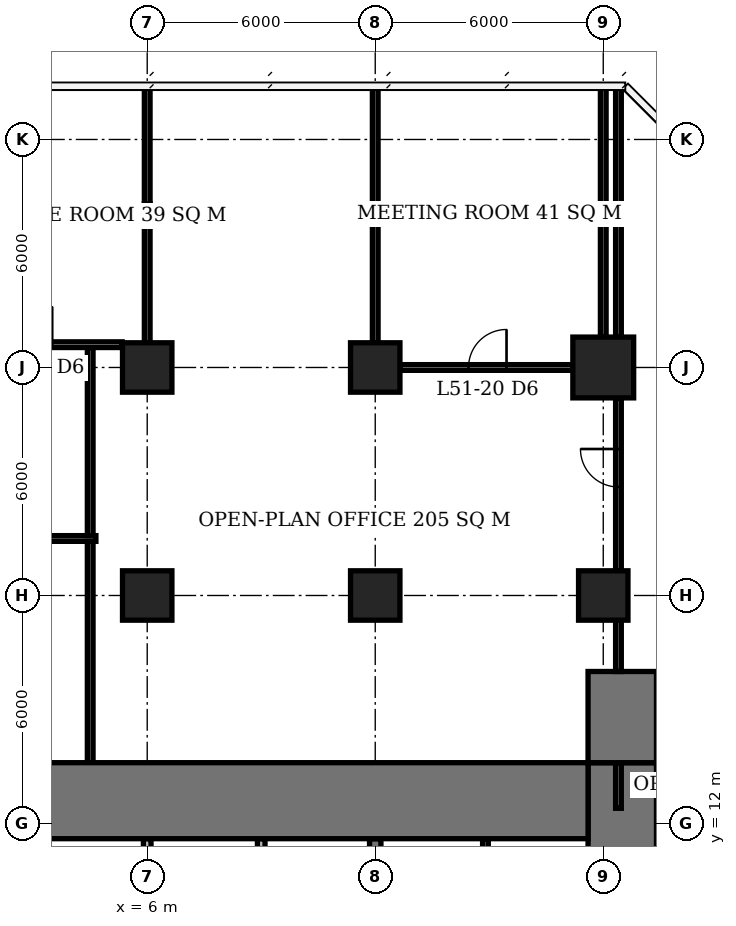
"""IFC4 building model, lengths in metres.
Left out: names, types, materials, properties, quantities, classifications, styles, units other than length and angle.
Written with IfcOpenShell. Run it as: python <this file> out.ifc"""

import sys

from ifc_helpers import new_model, si_unit, direction, frame, frame_2d, origin, origin_2d, place, context, subcontext, project, spatial, rectangle, extrude, element, fill, save


model = new_model("IFC4")
c1 = context("Model", 3, precision=1e-05, world=origin(), true_north=direction((0.0, 1.0)))
c2 = subcontext(c1, "Body", "Model", "MODEL_VIEW")
j1 = project(units=[si_unit("LENGTHUNIT", "METRE"), si_unit("PLANEANGLEUNIT", "RADIAN")], contexts=[c1])
p1 = place(None, origin())
s1 = spatial("IfcSite", under=j1, at=p1, CompositionType="ELEMENT")
p2 = place(p1, origin())
s2 = spatial("IfcBuilding", under=s1, at=p2, CompositionType="ELEMENT")
p3 = place(p2, frame((0.0, 0.0, 208.4)))
s3 = spatial("IfcBuildingStorey", under=s2, at=p3, CompositionType="ELEMENT", Elevation=208.4)
for number, where, z_axis, x_axis in (
    (1, (6.0, 18.0, 0.0), (0.0, 0.0, 1.0), (1.0, 0.0, 0.0)),
    (2, (6.0, 24.0, 0.0), (0.0, 0.0, 1.0), (1.0, 0.0, 0.0)),
    (3, (12.0, 18.0, 0.0), (0.0, 0.0, 1.0), (1.0, 0.0, 0.0)),
    (4, (12.0, 24.0, 0.0), (0.0, 0.0, 1.0), (1.0, 0.0, 0.0)),
    (5, (18.0, 18.0, 0.0), (0.0, 0.0, 1.0), (1.0, 0.0, 0.0)),
):
    element("IfcColumn", number, at=place(p3, frame(where, z_axis=z_axis, x_axis=x_axis)), inside=s3, PredefinedType="COLUMN", context=c2, shape_type="SweptSolid", body=[
        extrude(rectangle(XDim=1.3, YDim=1.3, at=origin_2d()), origin(), (0.0, 0.0, 1.0), 3.9),
    ])
p4 = place(p3, frame((18.0, 24.0, 0.0), z_axis=(0.0, 0.0, 1.0), x_axis=(1.0, 0.0, 0.0)))
e6 = element("IfcColumn", 6, at=p4, inside=s3, PredefinedType="COLUMN", context=c2, shape_type="SweptSolid", body=[
    extrude(rectangle(XDim=1.6, YDim=1.6, at=origin_2d()), origin(), (0.0, 0.0, 1.0), 3.9),
])
p5 = place(p3, frame((-5.6, 12.6, 0.0), z_axis=(0.0, 0.0, 1.0), x_axis=(1.0, 0.0, 0.0)))
e7 = element("IfcWall", 7, at=p5, inside=s3, PredefinedType="SHEAR", context=c2, shape_type="SweptSolid", body=[
    extrude(rectangle(XDim=23.2, YDim=2.0, at=frame_2d((11.6, 0.0))), origin(), (0.0, 0.0, 1.0), 3.9),
])
p6 = place(p3, frame((18.5, -7.6, 0.0), z_axis=(0.0, 0.0, 1.0), x_axis=(0.0, 1.0, 0.0)))
e8 = element("IfcWall", 8, at=p6, inside=s3, PredefinedType="SHEAR", context=c2, shape_type="SweptSolid", body=[
    extrude(rectangle(XDim=21.2, YDim=1.8, at=frame_2d((10.6, 0.0))), origin(), (0.0, 0.0, 1.0), 3.9),
])
p7 = place(p6, frame((9.2, 0.0, 0.0)))
e9 = element("IfcOpeningElement", 9, at=p7, cuts=e8, PredefinedType="OPENING", context=c2, shape_type="SweptSolid", body=[
    extrude(rectangle(XDim=1.8, YDim=2.4, at=frame_2d((0.9, 1.2))), frame((0.0, 0.91, 0.0), z_axis=(0.0, -1.0, 0.0), x_axis=(1.0, 0.0, 0.0)), (0.0, 0.0, 1.0), 1.82),
])
p8 = place(p3, frame((18.5, 13.6, 0.0), z_axis=(0.0, 0.0, 1.0), x_axis=(0.0, 1.0, 0.0)))
e10 = element("IfcWall", 10, at=p8, inside=s3, PredefinedType="SHEAR", context=c2, shape_type="SweptSolid", body=[
    extrude(rectangle(XDim=2.4, YDim=1.8, at=frame_2d((1.2, 0.0))), origin(), (0.0, 0.0, 1.0), 3.9),
])
p9 = place(p3, frame((12.0, 6.15, 0.0), z_axis=(0.0, 0.0, 1.0), x_axis=(0.0, 1.0, 0.0)))
e11 = element("IfcWall", 11, at=p9, inside=s3, PredefinedType="SHEAR", context=c2, shape_type="SweptSolid", body=[
    extrude(rectangle(XDim=5.45, YDim=0.3, at=frame_2d((2.725, 0.0))), origin(), (0.0, 0.0, 1.0), 3.9),
])
for number, where, z_axis, x_axis in (
    (12, (6.0, 6.15, 0.0), (0.0, 0.0, 1.0), (0.0, 1.0, 0.0)),
    (13, (9.0, 6.15, 0.0), (0.0, 0.0, 1.0), (0.0, 1.0, 0.0)),
):
    element("IfcWall", number, at=place(p3, frame(where, z_axis=z_axis, x_axis=x_axis)), inside=s3, PredefinedType="SOLIDWALL", context=c2, shape_type="SweptSolid", body=[
        extrude(rectangle(XDim=5.45, YDim=0.2, at=frame_2d((2.725, 0.0))), origin(), (0.0, 0.0, 1.0), 3.9),
    ])
p10 = place(p3, frame((14.9, 6.15, 0.0), z_axis=(0.0, 0.0, 1.0), x_axis=(0.0, 1.0, 0.0)))
e14 = element("IfcWall", 14, at=p10, inside=s3, PredefinedType="PLUMBINGWALL", context=c2, shape_type="SweptSolid", body=[
    extrude(rectangle(XDim=5.45, YDim=0.15, at=frame_2d((2.725, 0.0))), origin(), (0.0, 0.0, 1.0), 3.65),
])
p11 = place(p3, frame((12.66, 24.0, 0.0), z_axis=(0.0, 0.0, 1.0), x_axis=(1.0, 0.0, 0.0)))
e15 = element("IfcWall", 15, at=p11, inside=s3, PredefinedType="PARTITIONING", context=c2, shape_type="SweptSolid", body=[
    extrude(rectangle(XDim=4.54, YDim=0.15, at=frame_2d((2.27, 0.0))), origin(), (0.0, 0.0, 1.0), 3.65),
])
p12 = place(p11, frame((1.795, 0.0, 0.0)))
e16 = element("IfcOpeningElement", 16, at=p12, cuts=e15, PredefinedType="OPENING", context=c2, shape_type="SweptSolid", body=[
    extrude(rectangle(XDim=1.0, YDim=2.1, at=frame_2d((0.5, 1.05))), frame((0.0, 0.085, 0.0), z_axis=(0.0, -1.0, 0.0), x_axis=(1.0, 0.0, 0.0)), (0.0, 0.0, 1.0), 0.17),
])
p13 = place(p3, frame((0.66, 24.6, 0.0), z_axis=(0.0, 0.0, 1.0), x_axis=(1.0, 0.0, 0.0)))
e17 = element("IfcWall", 17, at=p13, inside=s3, PredefinedType="PARTITIONING", context=c2, shape_type="SweptSolid", body=[
    extrude(rectangle(XDim=4.68, YDim=0.15, at=frame_2d((2.34, 0.0))), origin(), (0.0, 0.0, 1.0), 3.65),
])
p14 = place(p13, frame((1.84, 0.0, 0.0)))
e18 = element("IfcOpeningElement", 18, at=p14, cuts=e17, PredefinedType="OPENING", context=c2, shape_type="SweptSolid", body=[
    extrude(rectangle(XDim=1.0, YDim=2.1, at=frame_2d((0.5, 1.05))), frame((0.0, 0.085, 0.0), z_axis=(0.0, -1.0, 0.0), x_axis=(1.0, 0.0, 0.0)), (0.0, 0.0, 1.0), 0.17),
])
p15 = place(p3, frame((6.0, 24.65, 0.0), z_axis=(0.0, 0.0, 1.0), x_axis=(0.0, 1.0, 0.0)))
e19 = element("IfcWall", 19, at=p15, inside=s3, PredefinedType="PARTITIONING", context=c2, shape_type="SweptSolid", body=[
    extrude(rectangle(XDim=3.66, YDim=0.15, at=frame_2d((1.83, 0.0))), origin(), (0.0, 0.0, 1.0), 2.65),
])
p16 = place(p3, frame((6.0, 28.31, 0.0), z_axis=(0.0, 0.0, 1.0), x_axis=(0.0, 1.0, 0.0)))
e20 = element("IfcWall", 20, at=p16, inside=s3, PredefinedType="PARTITIONING", context=c2, shape_type="SweptSolid", body=[
    extrude(rectangle(XDim=3.04, YDim=0.15, at=frame_2d((1.52, 0.0))), origin(), (0.0, 0.0, 1.0), 3.65),
])
p17 = place(p3, frame((12.0, 24.65, 0.0), z_axis=(0.0, 0.0, 1.0), x_axis=(0.0, 1.0, 0.0)))
e21 = element("IfcWall", 21, at=p17, inside=s3, PredefinedType="PARTITIONING", context=c2, shape_type="SweptSolid", body=[
    extrude(rectangle(XDim=3.66, YDim=0.15, at=frame_2d((1.83, 0.0))), origin(), (0.0, 0.0, 1.0), 2.65),
])
p18 = place(p3, frame((12.0, 28.31, 0.0), z_axis=(0.0, 0.0, 1.0), x_axis=(0.0, 1.0, 0.0)))
e22 = element("IfcWall", 22, at=p18, inside=s3, PredefinedType="PARTITIONING", context=c2, shape_type="SweptSolid", body=[
    extrude(rectangle(XDim=3.09, YDim=0.15, at=frame_2d((1.545, 0.0))), origin(), (0.0, 0.0, 1.0), 3.65),
])
p19 = place(p3, frame((18.0, 24.8, 0.0), z_axis=(0.0, 0.0, 1.0), x_axis=(0.0, 1.0, 0.0)))
e23 = element("IfcWall", 23, at=p19, inside=s3, PredefinedType="PARTITIONING", context=c2, shape_type="SweptSolid", body=[
    extrude(rectangle(XDim=3.51, YDim=0.15, at=frame_2d((1.755, 0.0))), origin(), (0.0, 0.0, 1.0), 2.65),
])
p20 = place(p3, frame((18.0, 28.31, 0.0), z_axis=(0.0, 0.0, 1.0), x_axis=(0.0, 1.0, 0.0)))
e24 = element("IfcWall", 24, at=p20, inside=s3, PredefinedType="PARTITIONING", context=c2, shape_type="SweptSolid", body=[
    extrude(rectangle(XDim=3.09, YDim=0.15, at=frame_2d((1.545, 0.0))), origin(), (0.0, 0.0, 1.0), 3.65),
])
p21 = place(p3, frame((-6.325, 19.5, 0.0), z_axis=(0.0, 0.0, 1.0), x_axis=(1.0, 0.0, 0.0)))
e25 = element("IfcWall", 25, at=p21, inside=s3, PredefinedType="PARTITIONING", context=c2, shape_type="SweptSolid", body=[
    extrude(rectangle(XDim=10.975, YDim=0.15, at=frame_2d((5.487, 0.0))), origin(), (0.0, 0.0, 1.0), 3.65),
])
p22 = place(p3, frame((4.5, 12.4, 0.0), z_axis=(0.0, 0.0, 1.0), x_axis=(0.0, 1.0, 0.0)))
e26 = element("IfcWall", 26, at=p22, inside=s3, PredefinedType="PARTITIONING", context=c2, shape_type="SweptSolid", body=[
    extrude(rectangle(XDim=7.025, YDim=0.15, at=frame_2d((3.513, 0.0))), origin(), (0.0, 0.0, 1.0), 3.65),
])
p23 = place(p3, frame((4.5, 19.575, 0.0), z_axis=(0.0, 0.0, 1.0), x_axis=(0.0, 1.0, 0.0)))
e27 = element("IfcWall", 27, at=p23, inside=s3, PredefinedType="PARTITIONING", context=c2, shape_type="SweptSolid", body=[
    extrude(rectangle(XDim=4.95, YDim=0.15, at=frame_2d((2.475, 0.0))), origin(), (0.0, 0.0, 1.0), 3.65),
])
p24 = place(p3, frame((18.4, 12.4, 0.0), z_axis=(0.0, 0.0, 1.0), x_axis=(0.0, 1.0, 0.0)))
e28 = element("IfcWall", 28, at=p24, inside=s3, PredefinedType="PARTITIONING", context=c2, shape_type="SweptSolid", body=[
    extrude(rectangle(XDim=1.2, YDim=0.15, at=frame_2d((0.6, 0.0))), origin(), (0.0, 0.0, 1.0), 3.65),
])
p25 = place(p3, frame((18.4, 16.0, 0.0), z_axis=(0.0, 0.0, 1.0), x_axis=(0.0, 1.0, 0.0)))
e29 = element("IfcWall", 29, at=p25, inside=s3, PredefinedType="PARTITIONING", context=c2, shape_type="SweptSolid", body=[
    extrude(rectangle(XDim=1.35, YDim=0.15, at=frame_2d((0.675, 0.0))), origin(), (0.0, 0.0, 1.0), 3.65),
])
p26 = place(p3, frame((18.4, 18.65, 0.0), z_axis=(0.0, 0.0, 1.0), x_axis=(0.0, 1.0, 0.0)))
e30 = element("IfcWall", 30, at=p26, inside=s3, PredefinedType="PARTITIONING", context=c2, shape_type="SweptSolid", body=[
    extrude(rectangle(XDim=4.55, YDim=0.15, at=frame_2d((2.275, 0.0))), origin(), (0.0, 0.0, 1.0), 3.65),
])
p27 = place(p26, frame((2.205, 0.0, 0.0)))
e31 = element("IfcOpeningElement", 31, at=p27, cuts=e30, PredefinedType="OPENING", context=c2, shape_type="SweptSolid", body=[
    extrude(rectangle(XDim=1.0, YDim=2.1, at=frame_2d((0.5, 1.05))), frame((0.0, 0.085, 0.0), z_axis=(0.0, -1.0, 0.0), x_axis=(1.0, 0.0, 0.0)), (0.0, 0.0, 1.0), 0.17),
])
p28 = place(p3, frame((18.4, 24.8, 0.0), z_axis=(0.0, 0.0, 1.0), x_axis=(0.0, 1.0, 0.0)))
e32 = element("IfcWall", 32, at=p28, inside=s3, PredefinedType="PARTITIONING", context=c2, shape_type="SweptSolid", body=[
    extrude(rectangle(XDim=3.34, YDim=0.15, at=frame_2d((1.67, 0.0))), origin(), (0.0, 0.0, 1.0), 2.65),
])
p29 = place(p3, frame((18.4, 28.14, 0.0), z_axis=(0.0, 0.0, 1.0), x_axis=(0.0, 1.0, 0.0)))
e33 = element("IfcWall", 33, at=p29, inside=s3, PredefinedType="PARTITIONING", context=c2, shape_type="SweptSolid", body=[
    extrude(rectangle(XDim=3.26, YDim=0.15, at=frame_2d((1.63, 0.0))), origin(), (0.0, 0.0, 1.0), 3.65),
])
p30 = place(p12, origin())
e34 = element("IfcDoor", 34, at=p30, inside=s3, OperationType="SINGLE_SWING_RIGHT", PredefinedType="DOOR", context=c2, shape_type="SweptSolid", body=[
    extrude(rectangle(XDim=1.0, YDim=2.1, at=frame_2d((0.5, 1.05))), frame((0.0, 0.025, 0.0), z_axis=(0.0, -1.0, 0.0), x_axis=(1.0, 0.0, 0.0)), (0.0, 0.0, 1.0), 0.05),
])
fill(e16, e34)
p31 = place(p27, origin())
e35 = element("IfcDoor", 35, at=p31, inside=s3, OperationType="SINGLE_SWING_RIGHT", PredefinedType="DOOR", context=c2, shape_type="SweptSolid", body=[
    extrude(rectangle(XDim=1.0, YDim=2.1, at=frame_2d((0.5, 1.05))), frame((0.0, 0.025, 0.0), z_axis=(0.0, -1.0, 0.0), x_axis=(1.0, 0.0, 0.0)), (0.0, 0.0, 1.0), 0.05),
])
fill(e31, e35)
save(model, sys.argv[1])
